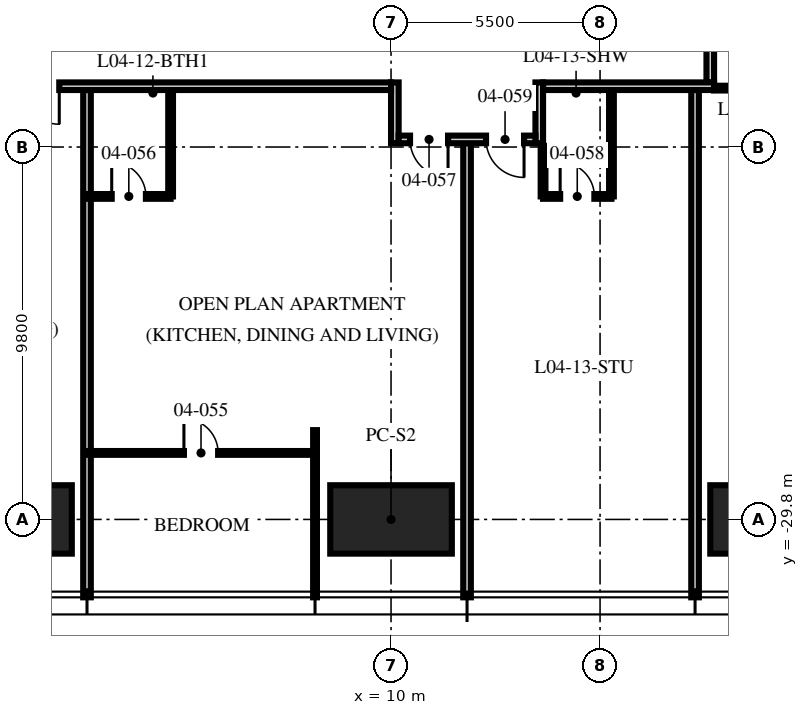
"""IFC4 building model, lengths in metres.
Left out: names, types, materials, properties, quantities, classifications, styles, units other than length and angle.
Written with IfcOpenShell. Run it as: python <this file> out.ifc"""

import sys

from ifc_helpers import new_model, si_unit, direction, frame, frame_2d, origin, origin_2d, place, context, subcontext, project, spatial, rectangle, hollow_rectangle, extrude, element, fill, save


model = new_model("IFC4")
c1 = context("Model", 3, precision=1e-05, world=origin(), true_north=direction((0.0, 1.0)))
c2 = subcontext(c1, "Body", "Model", "MODEL_VIEW")
j1 = project(units=[si_unit("LENGTHUNIT", "METRE"), si_unit("PLANEANGLEUNIT", "RADIAN")], contexts=[c1])
p1 = place(None, origin())
s1 = spatial("IfcSite", under=j1, at=p1, CompositionType="ELEMENT")
p2 = place(p1, origin())
s2 = spatial("IfcBuilding", under=s1, at=p2, CompositionType="ELEMENT")
p3 = place(p2, frame((0.0, 0.0, 21.0)))
s3 = spatial("IfcBuildingStorey", under=s2, at=p3, CompositionType="ELEMENT", Elevation=21.0)
for number, where, z_axis, x_axis in (
    (1, (20.0, -29.8, 0.0), (0.0, 0.0, 1.0), (1.0, 0.0, 0.0)),
    (2, (10.0, -29.8, 0.0), (0.0, 0.0, 1.0), (1.0, 0.0, 0.0)),
    (3, (0.0, -29.8, 0.0), (0.0, 0.0, 1.0), (1.0, 0.0, 0.0)),
):
    element("IfcColumn", number, at=place(p3, frame(where, z_axis=z_axis, x_axis=x_axis)), inside=s3, PredefinedType="COLUMN", context=c2, shape_type="SweptSolid", body=[
        extrude(hollow_rectangle(XDim=3.2, YDim=1.8, WallThickness=0.2, at=origin_2d()), origin(), (0.0, 0.0, 1.0), 3.75),
    ])
p4 = place(p3, frame((2.0, -18.5, 0.0), z_axis=(0.0, 0.0, 1.0), x_axis=(0.0, -1.0, 0.0)))
e4 = element("IfcWall", 4, at=p4, inside=s3, PredefinedType="PARTITIONING", context=c2, shape_type="SweptSolid", body=[
    extrude(rectangle(XDim=13.35, YDim=0.2, at=frame_2d((6.675, 0.0))), origin(), (0.0, 0.0, 1.0), 2.71),
])
p5 = place(p3, frame((8.0, -27.45, 0.0), z_axis=(0.0, 0.0, 1.0), x_axis=(0.0, -1.0, 0.0)))
e5 = element("IfcWall", 5, at=p5, inside=s3, PredefinedType="PARTITIONING", context=c2, shape_type="SweptSolid", body=[
    extrude(rectangle(XDim=4.4, YDim=0.1, at=frame_2d((2.2, 0.0))), origin(), (0.0, 0.0, 1.0), 2.71),
])
p6 = place(p3, frame((12.0, -19.9, 0.0), z_axis=(0.0, 0.0, 1.0), x_axis=(0.0, -1.0, 0.0)))
e6 = element("IfcWall", 6, at=p6, inside=s3, PredefinedType="PARTITIONING", context=c2, shape_type="SweptSolid", body=[
    extrude(rectangle(XDim=11.95, YDim=0.2, at=frame_2d((5.975, 0.0))), origin(), (0.0, 0.0, 1.0), 2.71),
])
p7 = place(p3, frame((18.0, -18.5, 0.0), z_axis=(0.0, 0.0, 1.0), x_axis=(0.0, -1.0, 0.0)))
e7 = element("IfcWall", 7, at=p7, inside=s3, PredefinedType="PARTITIONING", context=c2, shape_type="SweptSolid", body=[
    extrude(rectangle(XDim=13.35, YDim=0.2, at=frame_2d((6.675, 0.0))), origin(), (0.0, 0.0, 1.0), 2.3),
])
p8 = place(p3, frame((2.0, -28.05, 0.0), z_axis=(0.0, 0.0, 1.0), x_axis=(1.0, 0.0, 0.0)))
e8 = element("IfcWall", 8, at=p8, inside=s3, PredefinedType="PARTITIONING", context=c2, shape_type="SweptSolid", body=[
    extrude(rectangle(XDim=6.0, YDim=0.1, at=frame_2d((3.0, 0.0))), origin(), (0.0, 0.0, 1.0), 2.61),
])
p9 = place(p8, frame((2.55, 0.0, 0.0)))
e9 = element("IfcOpeningElement", 9, at=p9, cuts=e8, PredefinedType="OPENING", context=c2, shape_type="SweptSolid", body=[
    extrude(rectangle(XDim=0.9, YDim=2.1, at=frame_2d((0.45, 1.05))), frame((0.0, 0.06, 0.0), z_axis=(0.0, -1.0, 0.0), x_axis=(1.0, 0.0, 0.0)), (0.0, 0.0, 1.0), 0.12),
])
p10 = place(p3, frame((2.0, -21.3, 0.0), z_axis=(0.0, 0.0, 1.0), x_axis=(1.0, 0.0, 0.0)))
e10 = element("IfcWall", 10, at=p10, inside=s3, PredefinedType="PARTITIONING", context=c2, shape_type="SweptSolid", body=[
    extrude(rectangle(XDim=2.2, YDim=0.125, at=frame_2d((1.1, 0.0))), origin(), (0.0, 0.0, 1.0), 3.5),
])
p11 = place(p10, frame((0.65, 0.0, 0.0)))
e11 = element("IfcOpeningElement", 11, at=p11, cuts=e10, PredefinedType="OPENING", context=c2, shape_type="SweptSolid", body=[
    extrude(rectangle(XDim=0.9, YDim=2.1, at=frame_2d((0.45, 1.05))), frame((0.0, 0.073, 0.0), z_axis=(0.0, -1.0, 0.0), x_axis=(1.0, 0.0, 0.0)), (0.0, 0.0, 1.0), 0.145),
])
p12 = place(p3, frame((4.2, -18.5, 0.0), z_axis=(0.0, 0.0, 1.0), x_axis=(0.0, -1.0, 0.0)))
e12 = element("IfcWall", 12, at=p12, inside=s3, PredefinedType="PARTITIONING", context=c2, shape_type="SweptSolid", body=[
    extrude(rectangle(XDim=2.8, YDim=0.125, at=frame_2d((1.4, 0.0))), origin(), (0.0, 0.0, 1.0), 3.5),
])
p13 = place(p3, frame((14.0, -21.3, 0.0), z_axis=(0.0, 0.0, 1.0), x_axis=(1.0, 0.0, 0.0)))
e13 = element("IfcWall", 13, at=p13, inside=s3, PredefinedType="PARTITIONING", context=c2, shape_type="SweptSolid", body=[
    extrude(rectangle(XDim=1.8, YDim=0.125, at=frame_2d((0.9, 0.0))), origin(), (0.0, 0.0, 1.0), 2.61),
])
p14 = place(p13, frame((0.45, 0.0, 0.0)))
e14 = element("IfcOpeningElement", 14, at=p14, cuts=e13, PredefinedType="OPENING", context=c2, shape_type="SweptSolid", body=[
    extrude(rectangle(XDim=0.9, YDim=2.1, at=frame_2d((0.45, 1.05))), frame((0.0, 0.073, 0.0), z_axis=(0.0, -1.0, 0.0), x_axis=(1.0, 0.0, 0.0)), (0.0, 0.0, 1.0), 0.145),
])
p15 = place(p3, frame((14.0, -19.97, 0.0), z_axis=(0.0, 0.0, 1.0), x_axis=(0.0, -1.0, 0.0)))
e15 = element("IfcWall", 15, at=p15, inside=s3, PredefinedType="PARTITIONING", context=c2, shape_type="SweptSolid", body=[
    extrude(rectangle(XDim=1.33, YDim=0.125, at=frame_2d((0.665, 0.0))), origin(), (0.0, 0.0, 1.0), 3.5),
])
p16 = place(p3, frame((15.8, -18.5, 0.0), z_axis=(0.0, 0.0, 1.0), x_axis=(0.0, -1.0, 0.0)))
e16 = element("IfcWall", 16, at=p16, inside=s3, PredefinedType="PARTITIONING", context=c2, shape_type="SweptSolid", body=[
    extrude(rectangle(XDim=2.8, YDim=0.125, at=frame_2d((1.4, 0.0))), origin(), (0.0, 0.0, 1.0), 3.5),
])
p17 = place(p3, frame((18.5, -18.45, 0.0), z_axis=(0.0, 0.0, 1.0), x_axis=(1.0, 0.0, 0.0)))
e17 = element("IfcWall", 17, at=p17, inside=s3, PredefinedType="PARTITIONING", context=c2, shape_type="SweptSolid", body=[
    extrude(rectangle(XDim=2.8, YDim=0.125, at=frame_2d((1.4, 0.0))), origin(), (0.0, 0.0, 1.0), 2.3),
])
p18 = place(p3, frame((18.4, -18.3, 0.0), z_axis=(0.0, 0.0, 1.0), x_axis=(0.0, 1.0, 0.0)))
e18 = element("IfcWall", 18, at=p18, inside=s3, PredefinedType="PARTITIONING", context=c2, shape_type="SweptSolid", body=[
    extrude(rectangle(XDim=8.3, YDim=0.2, at=frame_2d((4.15, 0.0))), origin(), (0.0, 0.0, 1.0), 2.3),
])
p19 = place(p3, frame((18.5, -18.4, 0.0), z_axis=(0.0, 0.0, 1.0), x_axis=(-1.0, 0.0, 0.0)))
e19 = element("IfcWall", 19, at=p19, inside=s3, PredefinedType="PARTITIONING", context=c2, shape_type="SweptSolid", body=[
    extrude(rectangle(XDim=4.5, YDim=0.2, at=frame_2d((2.25, 0.0))), origin(), (0.0, 0.0, 1.0), 2.3),
])
p20 = place(p3, frame((13.9, -18.3, 0.0), z_axis=(0.0, 0.0, 1.0), x_axis=(0.0, -1.0, 0.0)))
e20 = element("IfcWall", 20, at=p20, inside=s3, PredefinedType="PARTITIONING", context=c2, shape_type="SweptSolid", body=[
    extrude(rectangle(XDim=1.6, YDim=0.2, at=frame_2d((0.8, 0.0))), origin(), (0.0, 0.0, 1.0), 3.5),
])
p21 = place(p3, frame((10.1, -18.3, 0.0), z_axis=(0.0, 0.0, 1.0), x_axis=(0.0, -1.0, 0.0)))
e21 = element("IfcWall", 21, at=p21, inside=s3, PredefinedType="PARTITIONING", context=c2, shape_type="SweptSolid", body=[
    extrude(rectangle(XDim=1.6, YDim=0.2, at=frame_2d((0.8, 0.0))), origin(), (0.0, 0.0, 1.0), 2.492),
])
p22 = place(p3, frame((13.8, -19.8, 0.0), z_axis=(0.0, 0.0, 1.0), x_axis=(-1.0, 0.0, 0.0)))
e22 = element("IfcWall", 22, at=p22, inside=s3, PredefinedType="PARTITIONING", context=c2, shape_type="SweptSolid", body=[
    extrude(rectangle(XDim=3.6, YDim=0.2, at=frame_2d((1.8, 0.0))), origin(), (0.0, 0.0, 1.0), 3.5),
])
p23 = place(p22, frame((2.3, 0.0, 0.0)))
e23 = element("IfcOpeningElement", 23, at=p23, cuts=e22, PredefinedType="OPENING", context=c2, shape_type="SweptSolid", body=[
    extrude(rectangle(XDim=1.0, YDim=2.2, at=frame_2d((0.5, 1.1))), frame((0.0, 0.11, 0.0), z_axis=(0.0, -1.0, 0.0), x_axis=(1.0, 0.0, 0.0)), (0.0, 0.0, 1.0), 0.22),
])
p24 = place(p22, frame((0.3, 0.0, 0.0)))
e24 = element("IfcOpeningElement", 24, at=p24, cuts=e22, PredefinedType="OPENING", context=c2, shape_type="SweptSolid", body=[
    extrude(rectangle(XDim=1.0, YDim=2.2, at=frame_2d((0.5, 1.1))), frame((0.0, 0.11, 0.0), z_axis=(0.0, -1.0, 0.0), x_axis=(1.0, 0.0, 0.0)), (0.0, 0.0, 1.0), 0.22),
])
p25 = place(p3, frame((10.0, -18.4, 0.0), z_axis=(0.0, 0.0, 1.0), x_axis=(-1.0, 0.0, 0.0)))
e25 = element("IfcWall", 25, at=p25, inside=s3, PredefinedType="PARTITIONING", context=c2, shape_type="SweptSolid", body=[
    extrude(rectangle(XDim=28.5, YDim=0.2, at=frame_2d((14.25, 0.0))), origin(), (0.0, 0.0, 1.0), 2.3),
])
p26 = place(p25, frame((8.73, 0.0, 0.0)))
e26 = element("IfcOpeningElement", 26, at=p26, cuts=e25, PredefinedType="OPENING", context=c2, shape_type="SweptSolid", body=[
    extrude(rectangle(XDim=1.0, YDim=2.2, at=frame_2d((0.5, 1.1))), frame((0.0, 0.11, 0.0), z_axis=(0.0, -1.0, 0.0), x_axis=(1.0, 0.0, 0.0)), (0.0, 0.0, 1.0), 0.22),
])
p27 = place(p26, origin())
e27 = element("IfcDoor", 27, at=p27, inside=s3, OperationType="SINGLE_SWING_LEFT", PredefinedType="DOOR", context=c2, shape_type="SweptSolid", body=[
    extrude(rectangle(XDim=1.0, YDim=2.2, at=frame_2d((0.5, 1.1))), frame((0.0, 0.025, 0.0), z_axis=(0.0, -1.0, 0.0), x_axis=(1.0, 0.0, 0.0)), (0.0, 0.0, 1.0), 0.05),
])
fill(e26, e27)
p28 = place(p9, origin())
e28 = element("IfcDoor", 28, at=p28, inside=s3, OperationType="SINGLE_SWING_LEFT", PredefinedType="DOOR", context=c2, shape_type="SweptSolid", body=[
    extrude(rectangle(XDim=0.9, YDim=2.1, at=frame_2d((0.45, 1.05))), frame((0.0, 0.025, 0.0), z_axis=(0.0, -1.0, 0.0), x_axis=(1.0, 0.0, 0.0)), (0.0, 0.0, 1.0), 0.05),
])
fill(e9, e28)
p29 = place(p11, origin())
e29 = element("IfcDoor", 29, at=p29, inside=s3, OperationType="SINGLE_SWING_LEFT", PredefinedType="DOOR", context=c2, shape_type="SweptSolid", body=[
    extrude(rectangle(XDim=0.9, YDim=2.1, at=frame_2d((0.45, 1.05))), frame((0.0, 0.025, 0.0), z_axis=(0.0, -1.0, 0.0), x_axis=(1.0, 0.0, 0.0)), (0.0, 0.0, 1.0), 0.05),
])
fill(e11, e29)
p30 = place(p23, origin())
e30 = element("IfcDoor", 30, at=p30, inside=s3, OperationType="SINGLE_SWING_LEFT", PredefinedType="DOOR", context=c2, shape_type="SweptSolid", body=[
    extrude(rectangle(XDim=1.0, YDim=2.2, at=frame_2d((0.5, 1.1))), frame((0.0, 0.025, 0.0), z_axis=(0.0, -1.0, 0.0), x_axis=(1.0, 0.0, 0.0)), (0.0, 0.0, 1.0), 0.05),
])
fill(e23, e30)
p31 = place(p14, origin())
e31 = element("IfcDoor", 31, at=p31, inside=s3, OperationType="SINGLE_SWING_LEFT", PredefinedType="DOOR", context=c2, shape_type="SweptSolid", body=[
    extrude(rectangle(XDim=0.9, YDim=2.1, at=frame_2d((0.45, 1.05))), frame((0.0, 0.025, 0.0), z_axis=(0.0, -1.0, 0.0), x_axis=(1.0, 0.0, 0.0)), (0.0, 0.0, 1.0), 0.05),
])
fill(e14, e31)
p32 = place(p24, origin())
e32 = element("IfcDoor", 32, at=p32, inside=s3, OperationType="SINGLE_SWING_LEFT", PredefinedType="DOOR", context=c2, shape_type="SweptSolid", body=[
    extrude(rectangle(XDim=1.0, YDim=2.2, at=frame_2d((0.5, 1.1))), frame((0.0, 0.025, 0.0), z_axis=(0.0, -1.0, 0.0), x_axis=(1.0, 0.0, 0.0)), (0.0, 0.0, 1.0), 0.05),
])
fill(e24, e32)
save(model, sys.argv[1])
